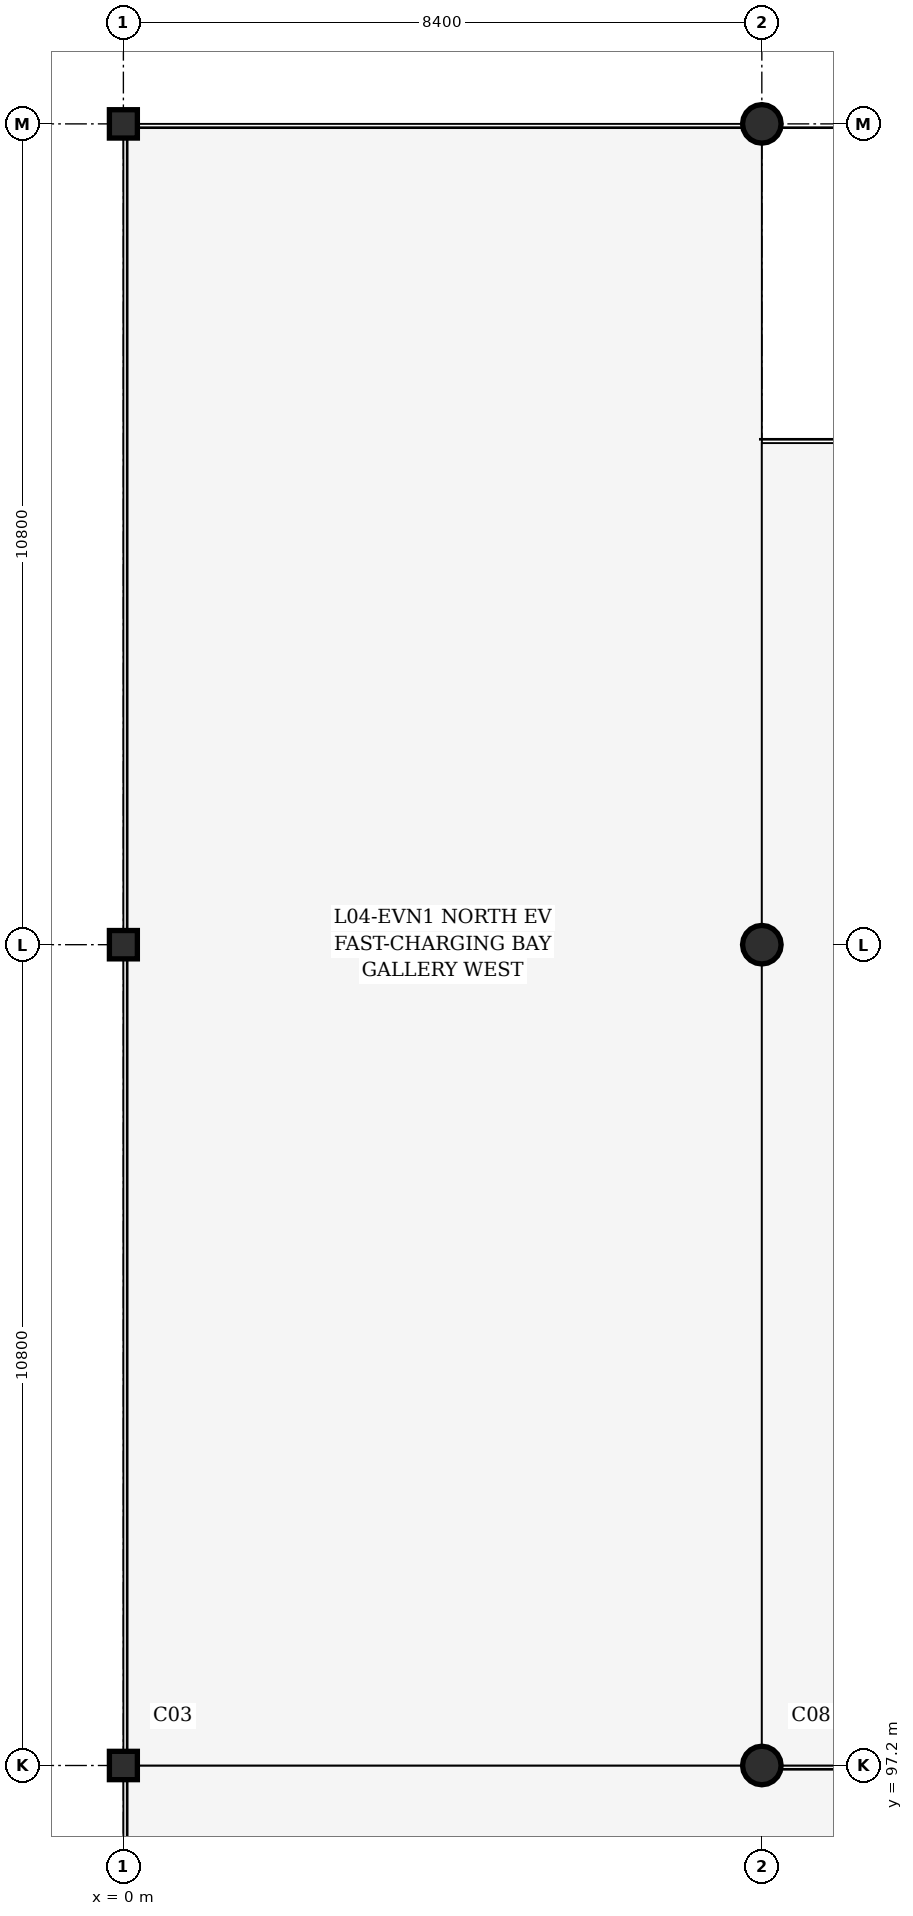
"""IFC4 building model, lengths in metres.
Left out: names, types, materials, properties, quantities, classifications, styles, units other than length and angle.
Written with IfcOpenShell. Run it as: python <this file> out.ifc"""

import sys

from ifc_helpers import new_model, si_unit, direction, frame, origin, origin_2d, place, context, subcontext, project, spatial, hollow_circle, i_section, extrude, element, save


model = new_model("IFC4")
c1 = context("Model", 3, precision=1e-05, world=origin(), true_north=direction((0.0, 1.0)))
c2 = subcontext(c1, "Body", "Model", "MODEL_VIEW")
j1 = project(units=[si_unit("LENGTHUNIT", "METRE"), si_unit("PLANEANGLEUNIT", "RADIAN")], contexts=[c1])
p1 = place(None, origin())
s1 = spatial("IfcSite", under=j1, at=p1, CompositionType="ELEMENT")
p2 = place(p1, origin())
s2 = spatial("IfcBuilding", under=s1, at=p2, CompositionType="ELEMENT")
p3 = place(p2, frame((0.0, 0.0, 16.2)))
s3 = spatial("IfcBuildingStorey", under=s2, at=p3, CompositionType="ELEMENT", Elevation=16.2)
for number, where, z_axis, x_axis in (
    (1, (0.0, 97.2, 0.0), (0.0, 0.0, 1.0), (1.0, 0.0, 0.0)),
    (2, (0.0, 108.0, 0.0), (0.0, 0.0, 1.0), (1.0, 0.0, 0.0)),
    (3, (0.0, 118.8, 0.0), (0.0, 0.0, 1.0), (1.0, 0.0, 0.0)),
):
    element("IfcColumn", number, at=place(p3, frame(where, z_axis=z_axis, x_axis=x_axis)), inside=s3, PredefinedType="COLUMN", context=c2, shape_type="SweptSolid", body=[
        extrude(i_section(OverallWidth=0.373, OverallDepth=0.368, WebThickness=0.014, FlangeThickness=0.024, FilletRadius=0.015, at=origin_2d()), origin(), (0.0, 0.0, 1.0), 3.6),
    ])
for number, where, z_axis, x_axis in (
    (4, (8.4, 97.2, 0.0), (0.0, 0.0, 1.0), (1.0, 0.0, 0.0)),
    (5, (8.4, 108.0, 0.0), (0.0, 0.0, 1.0), (1.0, 0.0, 0.0)),
    (6, (8.4, 118.8, 0.0), (0.0, 0.0, 1.0), (1.0, 0.0, 0.0)),
):
    element("IfcColumn", number, at=place(p3, frame(where, z_axis=z_axis, x_axis=x_axis)), inside=s3, PredefinedType="COLUMN", context=c2, shape_type="SweptSolid", body=[
        extrude(hollow_circle(Radius=0.254, WallThickness=0.016, at=origin_2d()), origin(), (0.0, 0.0, 1.0), 3.6),
    ])
save(model, sys.argv[1])
